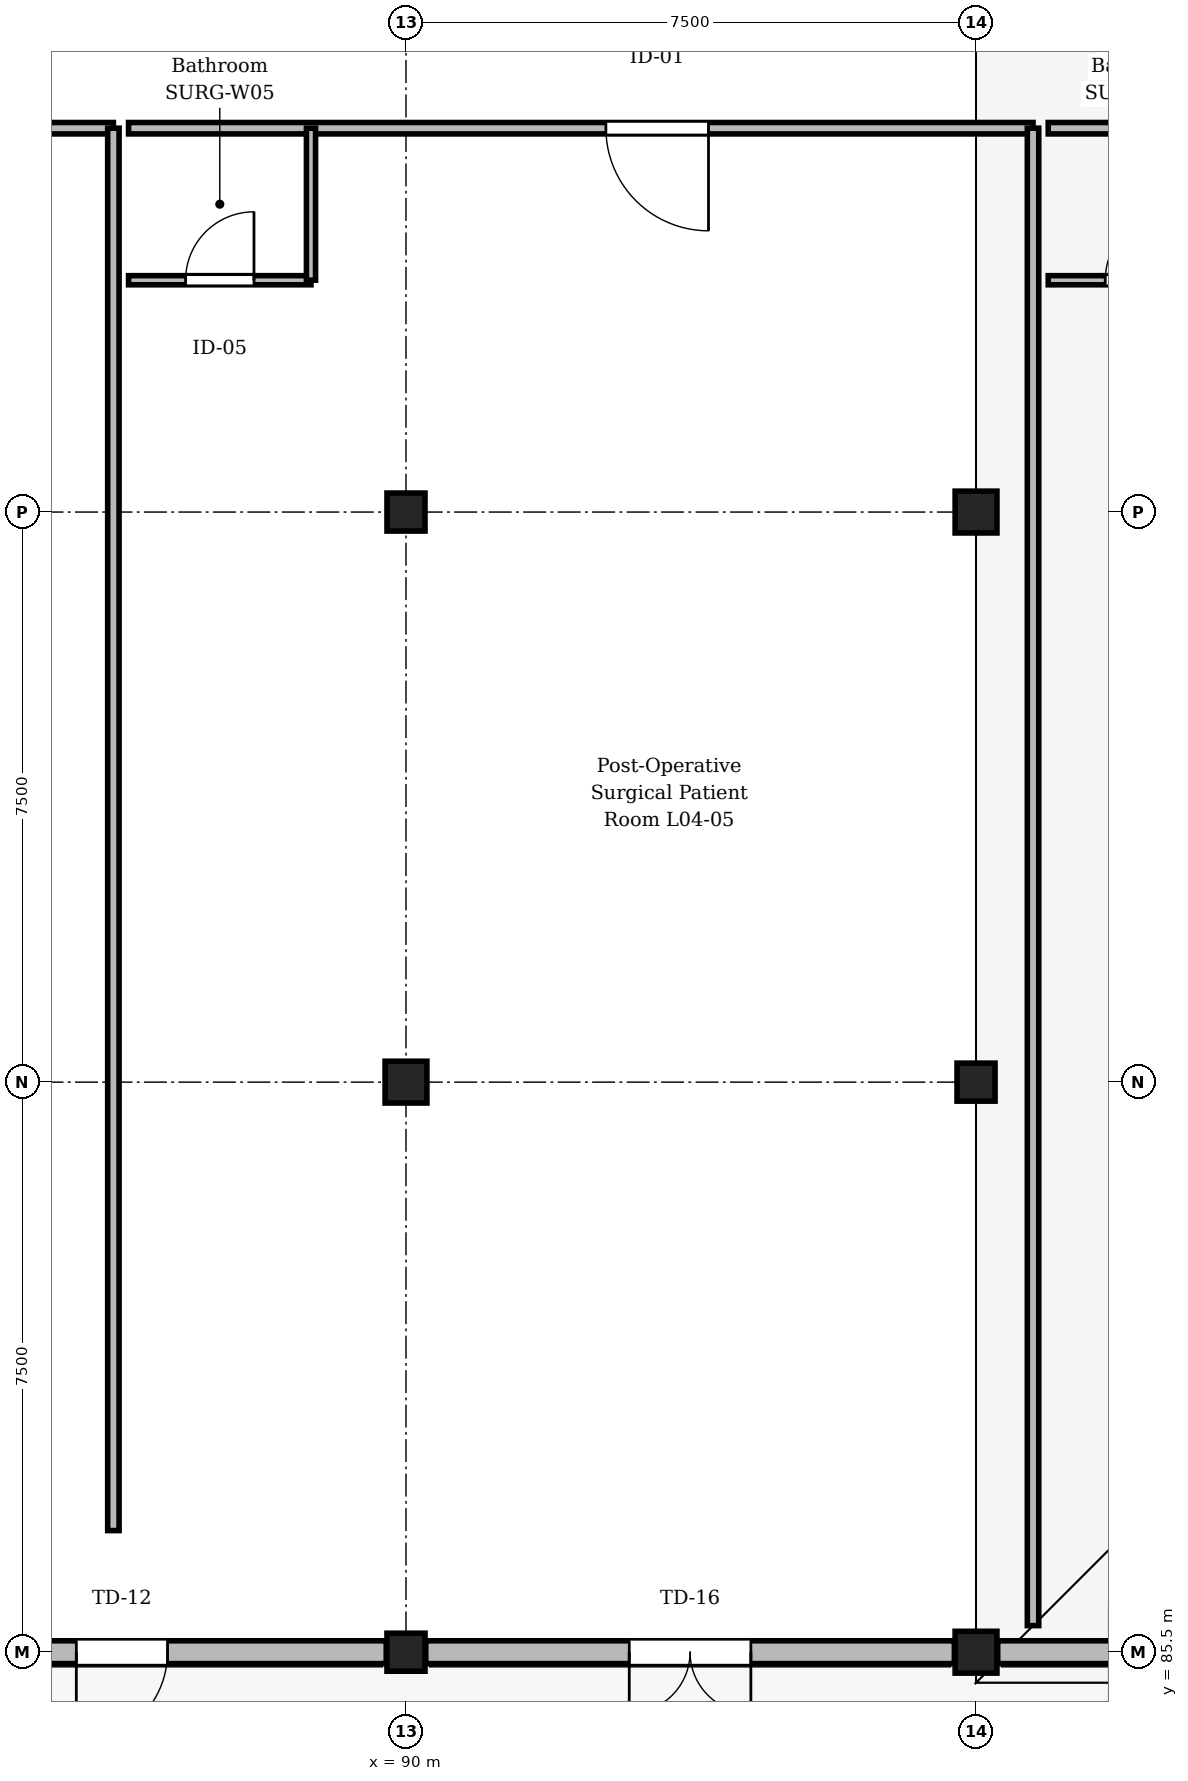
"""IFC4 building model, lengths in metres.
Left out: names, types, materials, properties, quantities, classifications, styles, units other than length and angle.
Written with IfcOpenShell. Run it as: python <this file> out.ifc"""

import sys

from ifc_helpers import new_model, si_unit, direction, frame, frame_2d, origin, origin_2d, place, context, subcontext, project, spatial, rectangle, extrude, element, fill, save


model = new_model("IFC4")
c1 = context("Model", 3, precision=1e-05, world=origin(), true_north=direction((0.0, 1.0)))
c2 = subcontext(c1, "Body", "Model", "MODEL_VIEW")
j1 = project(units=[si_unit("LENGTHUNIT", "METRE"), si_unit("PLANEANGLEUNIT", "RADIAN")], contexts=[c1])
p1 = place(None, origin())
s1 = spatial("IfcSite", under=j1, at=p1, CompositionType="ELEMENT")
p2 = place(p1, origin())
s2 = spatial("IfcBuilding", under=s1, at=p2, CompositionType="ELEMENT")
p3 = place(p2, frame((0.0, 0.0, 17.85)))
s3 = spatial("IfcBuildingStorey", under=s2, at=p3, CompositionType="ELEMENT", Elevation=17.85)
p4 = place(p3, frame((90.0, 85.5, 0.0), z_axis=(0.0, 0.0, 1.0), x_axis=(1.0, 0.0, 0.0)))
e1 = element("IfcColumn", 1, at=p4, inside=s3, PredefinedType="COLUMN", context=c2, shape_type="SweptSolid", body=[
    extrude(rectangle(XDim=0.5, YDim=0.5, at=origin_2d()), origin(), (0.0, 0.0, 1.0), 4.05),
])
p5 = place(p3, frame((90.0, 93.0, 0.0), z_axis=(0.0, 0.0, 1.0), x_axis=(1.0, 0.0, 0.0)))
e2 = element("IfcColumn", 2, at=p5, inside=s3, PredefinedType="COLUMN", context=c2, shape_type="SweptSolid", body=[
    extrude(rectangle(XDim=0.55, YDim=0.55, at=origin_2d()), origin(), (0.0, 0.0, 1.0), 4.05),
])
p6 = place(p3, frame((90.0, 100.5, 0.0), z_axis=(0.0, 0.0, 1.0), x_axis=(1.0, 0.0, 0.0)))
e3 = element("IfcColumn", 3, at=p6, inside=s3, PredefinedType="COLUMN", context=c2, shape_type="SweptSolid", body=[
    extrude(rectangle(XDim=0.5, YDim=0.5, at=origin_2d()), origin(), (0.0, 0.0, 1.0), 4.05),
])
p7 = place(p3, frame((97.5, 85.5, 0.0), z_axis=(0.0, 0.0, 1.0), x_axis=(1.0, 0.0, 0.0)))
e4 = element("IfcColumn", 4, at=p7, inside=s3, PredefinedType="COLUMN", context=c2, shape_type="SweptSolid", body=[
    extrude(rectangle(XDim=0.55, YDim=0.55, at=origin_2d()), origin(), (0.0, 0.0, 1.0), 4.05),
])
p8 = place(p3, frame((97.5, 93.0, 0.0), z_axis=(0.0, 0.0, 1.0), x_axis=(1.0, 0.0, 0.0)))
e5 = element("IfcColumn", 5, at=p8, inside=s3, PredefinedType="COLUMN", context=c2, shape_type="SweptSolid", body=[
    extrude(rectangle(XDim=0.5, YDim=0.5, at=origin_2d()), origin(), (0.0, 0.0, 1.0), 4.05),
])
p9 = place(p3, frame((97.5, 100.5, 0.0), z_axis=(0.0, 0.0, 1.0), x_axis=(1.0, 0.0, 0.0)))
e6 = element("IfcColumn", 6, at=p9, inside=s3, PredefinedType="COLUMN", context=c2, shape_type="SweptSolid", body=[
    extrude(rectangle(XDim=0.55, YDim=0.55, at=origin_2d()), origin(), (0.0, 0.0, 1.0), 4.05),
])
p10 = place(p3, frame((89.74, 85.5, 0.0), z_axis=(0.0, 0.0, 1.0), x_axis=(-1.0, 0.0, 0.0)))
e7 = element("IfcWall", 7, at=p10, inside=s3, PredefinedType="STANDARD", context=c2, shape_type="SweptSolid", body=[
    extrude(rectangle(XDim=6.955, YDim=0.3, at=frame_2d((3.478, 0.0))), origin(), (0.0, 0.0, 1.0), 3.03),
])
p11 = place(p10, frame((2.877, 0.0, 0.0)))
e8 = element("IfcOpeningElement", 8, at=p11, cuts=e7, PredefinedType="OPENING", context=c2, shape_type="SweptSolid", body=[
    extrude(rectangle(XDim=1.2, YDim=2.3, at=frame_2d((0.6, 1.15))), frame((0.0, 0.16, 0.0), z_axis=(0.0, -1.0, 0.0), x_axis=(1.0, 0.0, 0.0)), (0.0, 0.0, 1.0), 0.32),
])
p12 = place(p3, frame((97.215, 85.5, 0.0), z_axis=(0.0, 0.0, 1.0), x_axis=(-1.0, 0.0, 0.0)))
e9 = element("IfcWall", 9, at=p12, inside=s3, PredefinedType="STANDARD", context=c2, shape_type="SweptSolid", body=[
    extrude(rectangle(XDim=6.955, YDim=0.3, at=frame_2d((3.478, 0.0))), origin(), (0.0, 0.0, 1.0), 3.03),
])
p13 = place(p12, frame((2.677, 0.0, 0.0)))
e10 = element("IfcOpeningElement", 10, at=p13, cuts=e9, PredefinedType="OPENING", context=c2, shape_type="SweptSolid", body=[
    extrude(rectangle(XDim=1.6, YDim=2.35, at=frame_2d((0.8, 1.175))), frame((0.0, 0.16, 0.0), z_axis=(0.0, -1.0, 0.0), x_axis=(1.0, 0.0, 0.0)), (0.0, 0.0, 1.0), 0.32),
])
p14 = place(p3, frame((104.765, 85.5, 0.0), z_axis=(0.0, 0.0, 1.0), x_axis=(-1.0, 0.0, 0.0)))
e11 = element("IfcWall", 11, at=p14, inside=s3, PredefinedType="STANDARD", context=c2, shape_type="SweptSolid", body=[
    extrude(rectangle(XDim=6.98, YDim=0.3, at=frame_2d((3.49, 0.0))), origin(), (0.0, 0.0, 1.0), 3.77),
])
p15 = place(p14, frame((2.89, 0.0, 0.0)))
e12 = element("IfcOpeningElement", 12, at=p15, cuts=e11, PredefinedType="OPENING", context=c2, shape_type="SweptSolid", body=[
    extrude(rectangle(XDim=1.2, YDim=2.3, at=frame_2d((0.6, 1.15))), frame((0.0, 0.16, 0.0), z_axis=(0.0, -1.0, 0.0), x_axis=(1.0, 0.0, 0.0)), (0.0, 0.0, 1.0), 0.32),
])
p16 = place(p3, frame((86.15, 105.55, 0.0), z_axis=(0.0, 0.0, 1.0), x_axis=(-1.0, 0.0, 0.0)))
e13 = element("IfcWall", 13, at=p16, inside=s3, PredefinedType="PARTITIONING", context=c2, shape_type="SweptSolid", body=[
    extrude(rectangle(XDim=11.9, YDim=0.15, at=frame_2d((5.95, 0.0))), origin(), (0.0, 0.0, 1.0), 3.755),
])
p17 = place(p16, frame((6.28, 0.0, 0.0)))
e14 = element("IfcOpeningElement", 14, at=p17, cuts=e13, PredefinedType="OPENING", context=c2, shape_type="SweptSolid", body=[
    extrude(rectangle(XDim=1.35, YDim=2.25, at=frame_2d((0.675, 1.125))), frame((0.0, 0.085, 0.0), z_axis=(0.0, -1.0, 0.0), x_axis=(1.0, 0.0, 0.0)), (0.0, 0.0, 1.0), 0.17),
])
p18 = place(p3, frame((98.25, 105.55, 0.0), z_axis=(0.0, 0.0, 1.0), x_axis=(-1.0, 0.0, 0.0)))
e15 = element("IfcWall", 15, at=p18, inside=s3, PredefinedType="PARTITIONING", context=c2, shape_type="SweptSolid", body=[
    extrude(rectangle(XDim=11.9, YDim=0.15, at=frame_2d((5.95, 0.0))), origin(), (0.0, 0.0, 1.0), 3.755),
])
p19 = place(p18, frame((4.27, 0.0, 0.0)))
e16 = element("IfcOpeningElement", 16, at=p19, cuts=e15, PredefinedType="OPENING", context=c2, shape_type="SweptSolid", body=[
    extrude(rectangle(XDim=1.35, YDim=2.25, at=frame_2d((0.675, 1.125))), frame((0.0, 0.085, 0.0), z_axis=(0.0, -1.0, 0.0), x_axis=(1.0, 0.0, 0.0)), (0.0, 0.0, 1.0), 0.17),
])
p20 = place(p3, frame((86.35, 103.55, 0.0), z_axis=(0.0, 0.0, 1.0), x_axis=(1.0, 0.0, 0.0)))
e17 = element("IfcWall", 17, at=p20, inside=s3, PredefinedType="PARTITIONING", context=c2, shape_type="SweptSolid", body=[
    extrude(rectangle(XDim=2.4, YDim=0.12, at=frame_2d((1.2, 0.0))), origin(), (0.0, 0.0, 1.0), 3.755),
])
p21 = place(p20, frame((0.75, 0.0, 0.0)))
e18 = element("IfcOpeningElement", 18, at=p21, cuts=e17, PredefinedType="OPENING", context=c2, shape_type="SweptSolid", body=[
    extrude(rectangle(XDim=0.9, YDim=2.1, at=frame_2d((0.45, 1.05))), frame((0.0, 0.07, 0.0), z_axis=(0.0, -1.0, 0.0), x_axis=(1.0, 0.0, 0.0)), (0.0, 0.0, 1.0), 0.14),
])
p22 = place(p3, frame((88.75, 103.55, 0.0), z_axis=(0.0, 0.0, 1.0), x_axis=(0.0, 1.0, 0.0)))
e19 = element("IfcWall", 19, at=p22, inside=s3, PredefinedType="PARTITIONING", context=c2, shape_type="SweptSolid", body=[
    extrude(rectangle(XDim=2.0, YDim=0.12, at=frame_2d((1.0, 0.0))), origin(), (0.0, 0.0, 1.0), 3.755),
])
p23 = place(p3, frame((110.35, 105.55, 0.0), z_axis=(0.0, 0.0, 1.0), x_axis=(-1.0, 0.0, 0.0)))
e20 = element("IfcWall", 20, at=p23, inside=s3, PredefinedType="PARTITIONING", context=c2, shape_type="SweptSolid", body=[
    extrude(rectangle(XDim=11.9, YDim=0.15, at=frame_2d((5.95, 0.0))), origin(), (0.0, 0.0, 1.0), 3.755),
])
p24 = place(p23, frame((1.255, 0.0, 0.0)))
e21 = element("IfcOpeningElement", 21, at=p24, cuts=e20, PredefinedType="OPENING", context=c2, shape_type="SweptSolid", body=[
    extrude(rectangle(XDim=1.35, YDim=2.25, at=frame_2d((0.675, 1.125))), frame((0.0, 0.085, 0.0), z_axis=(0.0, -1.0, 0.0), x_axis=(1.0, 0.0, 0.0)), (0.0, 0.0, 1.0), 0.17),
])
p25 = place(p3, frame((98.45, 103.55, 0.0), z_axis=(0.0, 0.0, 1.0), x_axis=(1.0, 0.0, 0.0)))
e22 = element("IfcWall", 22, at=p25, inside=s3, PredefinedType="PARTITIONING", context=c2, shape_type="SweptSolid", body=[
    extrude(rectangle(XDim=2.4, YDim=0.12, at=frame_2d((1.2, 0.0))), origin(), (0.0, 0.0, 1.0), 3.755),
])
p26 = place(p25, frame((0.75, 0.0, 0.0)))
e23 = element("IfcOpeningElement", 23, at=p26, cuts=e22, PredefinedType="OPENING", context=c2, shape_type="SweptSolid", body=[
    extrude(rectangle(XDim=0.9, YDim=2.1, at=frame_2d((0.45, 1.05))), frame((0.0, 0.07, 0.0), z_axis=(0.0, -1.0, 0.0), x_axis=(1.0, 0.0, 0.0)), (0.0, 0.0, 1.0), 0.14),
])
p27 = place(p3, frame((86.15, 87.1, 0.0), z_axis=(0.0, 0.0, 1.0), x_axis=(0.0, 1.0, 0.0)))
e24 = element("IfcWall", 24, at=p27, inside=s3, PredefinedType="PARTITIONING", context=c2, shape_type="SweptSolid", body=[
    extrude(rectangle(XDim=18.45, YDim=0.15, at=frame_2d((9.225, 0.0))), origin(), (0.0, 0.0, 1.0), 3.215),
])
p28 = place(p3, frame((98.25, 85.85, 0.0), z_axis=(0.0, 0.0, 1.0), x_axis=(0.0, 1.0, 0.0)))
e25 = element("IfcWall", 25, at=p28, inside=s3, PredefinedType="PARTITIONING", context=c2, shape_type="SweptSolid", body=[
    extrude(rectangle(XDim=19.7, YDim=0.15, at=frame_2d((9.85, 0.0))), origin(), (0.0, 0.0, 1.0), 3.755),
])
p29 = place(p11, origin())
e26 = element("IfcDoor", 26, at=p29, inside=s3, OperationType="SINGLE_SWING_RIGHT", PredefinedType="DOOR", context=c2, shape_type="SweptSolid", body=[
    extrude(rectangle(XDim=1.2, YDim=2.3, at=frame_2d((0.6, 1.15))), frame((0.0, 0.025, 0.0), z_axis=(0.0, -1.0, 0.0), x_axis=(1.0, 0.0, 0.0)), (0.0, 0.0, 1.0), 0.05),
])
fill(e8, e26)
p30 = place(p13, origin())
e27 = element("IfcDoor", 27, at=p30, inside=s3, OperationType="DOUBLE_DOOR_SINGLE_SWING", PredefinedType="DOOR", context=c2, shape_type="SweptSolid", body=[
    extrude(rectangle(XDim=1.6, YDim=2.35, at=frame_2d((0.8, 1.175))), frame((0.0, 0.025, 0.0), z_axis=(0.0, -1.0, 0.0), x_axis=(1.0, 0.0, 0.0)), (0.0, 0.0, 1.0), 0.05),
])
fill(e10, e27)
p31 = place(p19, origin())
e28 = element("IfcDoor", 28, at=p31, inside=s3, OperationType="SINGLE_SWING_LEFT", PredefinedType="DOOR", context=c2, shape_type="SweptSolid", body=[
    extrude(rectangle(XDim=1.35, YDim=2.25, at=frame_2d((0.675, 1.125))), frame((0.0, 0.025, 0.0), z_axis=(0.0, -1.0, 0.0), x_axis=(1.0, 0.0, 0.0)), (0.0, 0.0, 1.0), 0.05),
])
fill(e16, e28)
p32 = place(p21, origin())
e29 = element("IfcDoor", 29, at=p32, inside=s3, OperationType="SINGLE_SWING_RIGHT", PredefinedType="DOOR", context=c2, shape_type="SweptSolid", body=[
    extrude(rectangle(XDim=0.9, YDim=2.1, at=frame_2d((0.45, 1.05))), frame((0.0, 0.025, 0.0), z_axis=(0.0, -1.0, 0.0), x_axis=(1.0, 0.0, 0.0)), (0.0, 0.0, 1.0), 0.05),
])
fill(e18, e29)
p33 = place(p26, origin())
e30 = element("IfcDoor", 30, at=p33, inside=s3, OperationType="SINGLE_SWING_RIGHT", PredefinedType="DOOR", context=c2, shape_type="SweptSolid", body=[
    extrude(rectangle(XDim=0.9, YDim=2.1, at=frame_2d((0.45, 1.05))), frame((0.0, 0.025, 0.0), z_axis=(0.0, -1.0, 0.0), x_axis=(1.0, 0.0, 0.0)), (0.0, 0.0, 1.0), 0.05),
])
fill(e23, e30)
save(model, sys.argv[1])
